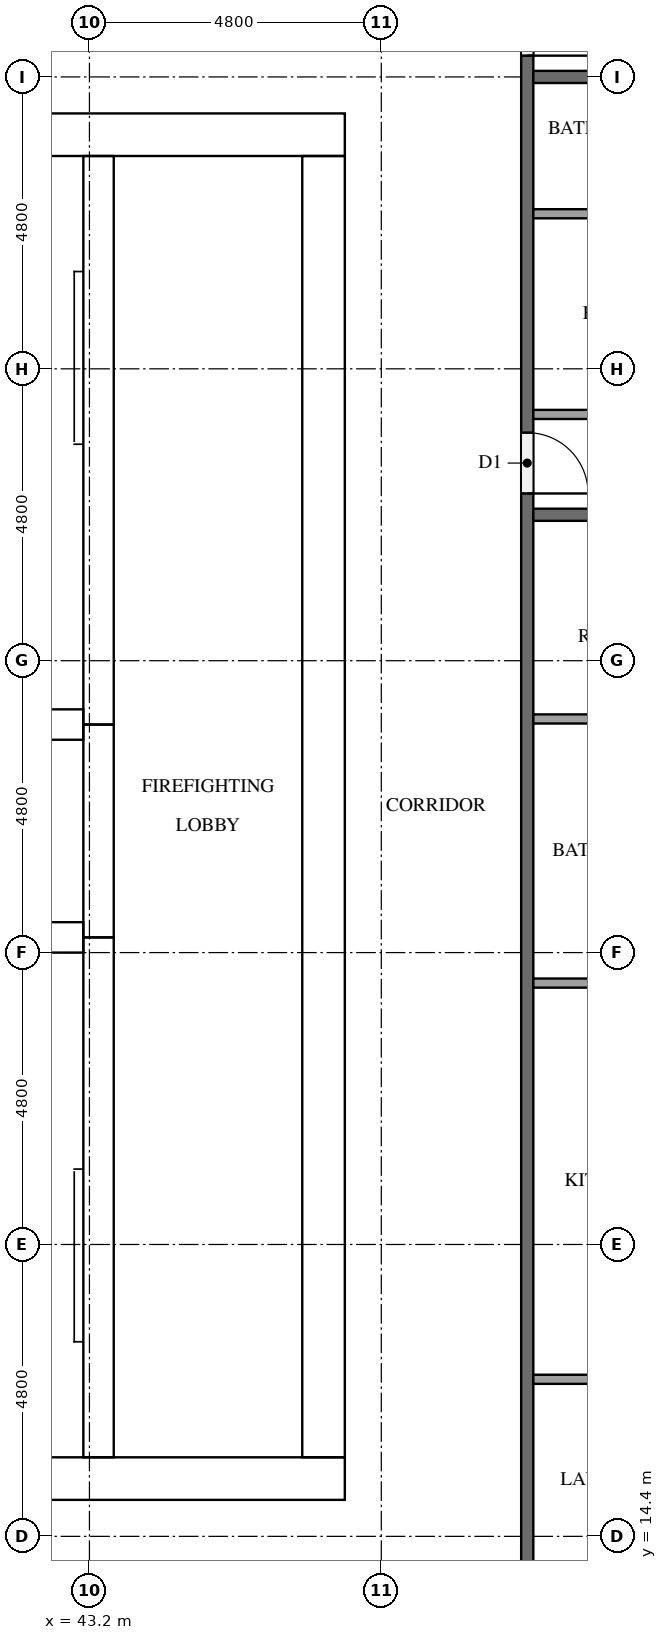
"""IFC4 building model, lengths in metres.
Left out: names, types, materials, properties, quantities, classifications, styles, units other than length and angle.
Written with IfcOpenShell. Run it as: python <this file> out.ifc"""

import sys

from ifc_helpers import new_model, si_unit, direction, frame, frame_2d, origin, place, context, subcontext, project, spatial, rectangle, extrude, element, fill, save


model = new_model("IFC4")
c1 = context("Model", 3, precision=1e-05, world=origin(), true_north=direction((0.0, 1.0)))
c2 = subcontext(c1, "Body", "Model", "MODEL_VIEW")
j1 = project(units=[si_unit("LENGTHUNIT", "METRE"), si_unit("PLANEANGLEUNIT", "RADIAN")], contexts=[c1])
p1 = place(None, origin())
s1 = spatial("IfcSite", under=j1, at=p1, CompositionType="ELEMENT")
p2 = place(p1, origin())
s2 = spatial("IfcBuilding", under=s1, at=p2, CompositionType="ELEMENT")
p3 = place(p2, frame((0.0, 0.0, 185.9)))
s3 = spatial("IfcBuildingStorey", under=s2, at=p3, CompositionType="ELEMENT", Elevation=185.9)
p4 = place(p3, frame((15.0, 15.35, 0.0), z_axis=(0.0, 0.0, 1.0), x_axis=(1.0, 0.0, 0.0)))
e1 = element("IfcWall", 1, at=p4, inside=s3, PredefinedType="SHEAR", context=c2, shape_type="SweptSolid", body=[
    extrude(rectangle(XDim=32.4, YDim=0.7, at=frame_2d((16.2, 0.0))), origin(), (0.0, 0.0, 1.0), 3.2),
])
p5 = place(p4, frame((15.3, 0.0, 0.0)))
e2 = element("IfcOpeningElement", 2, at=p5, cuts=e1, PredefinedType="OPENING", context=c2, shape_type="SweptSolid", body=[
    extrude(rectangle(XDim=1.8, YDim=2.1, at=frame_2d((0.9, 1.05))), frame((0.0, 0.36, 0.0), z_axis=(0.0, -1.0, 0.0), x_axis=(1.0, 0.0, 0.0)), (0.0, 0.0, 1.0), 0.72),
])
p6 = place(p3, frame((15.0, 37.45, 0.0), z_axis=(0.0, 0.0, 1.0), x_axis=(1.0, 0.0, 0.0)))
e3 = element("IfcWall", 3, at=p6, inside=s3, PredefinedType="SHEAR", context=c2, shape_type="SweptSolid", body=[
    extrude(rectangle(XDim=32.4, YDim=0.7, at=frame_2d((16.2, 0.0))), origin(), (0.0, 0.0, 1.0), 3.2),
])
p7 = place(p6, frame((15.3, 0.0, 0.0)))
e4 = element("IfcOpeningElement", 4, at=p7, cuts=e3, PredefinedType="OPENING", context=c2, shape_type="SweptSolid", body=[
    extrude(rectangle(XDim=1.8, YDim=2.1, at=frame_2d((0.9, 1.05))), frame((0.0, 0.36, 0.0), z_axis=(0.0, -1.0, 0.0), x_axis=(1.0, 0.0, 0.0)), (0.0, 0.0, 1.0), 0.72),
])
p8 = place(p6, frame((1.544, 0.0, 0.0)))
e5 = element("IfcOpeningElement", 5, at=p8, cuts=e3, PredefinedType="OPENING", context=c2, shape_type="SweptSolid", body=[
    extrude(rectangle(XDim=1.0, YDim=2.1, at=frame_2d((0.5, 1.05))), frame((0.0, 0.36, 0.0), z_axis=(0.0, -1.0, 0.0), x_axis=(1.0, 0.0, 0.0)), (0.0, 0.0, 1.0), 0.72),
])
p9 = place(p6, frame((5.219, 0.0, 0.0)))
e6 = element("IfcOpeningElement", 6, at=p9, cuts=e3, PredefinedType="OPENING", context=c2, shape_type="SweptSolid", body=[
    extrude(rectangle(XDim=1.0, YDim=2.1, at=frame_2d((0.5, 1.05))), frame((0.0, 0.36, 0.0), z_axis=(0.0, -1.0, 0.0), x_axis=(1.0, 0.0, 0.0)), (0.0, 0.0, 1.0), 0.72),
])
p10 = place(p3, frame((47.05, 15.7, 0.0), z_axis=(0.0, 0.0, 1.0), x_axis=(0.0, 1.0, 0.0)))
e7 = element("IfcWall", 7, at=p10, inside=s3, PredefinedType="SHEAR", context=c2, shape_type="SweptSolid", body=[
    extrude(rectangle(XDim=21.4, YDim=0.7, at=frame_2d((10.7, 0.0))), origin(), (0.0, 0.0, 1.0), 3.2),
])
p11 = place(p10, frame((10.4, 0.0, 0.0)))
e8 = element("IfcOpeningElement", 8, at=p11, cuts=e7, PredefinedType="OPENING", context=c2, shape_type="SweptSolid", body=[
    extrude(rectangle(XDim=1.2, YDim=2.1, at=frame_2d((0.6, 1.05))), frame((0.0, 0.36, 0.0), z_axis=(0.0, -1.0, 0.0), x_axis=(1.0, 0.0, 0.0)), (0.0, 0.0, 1.0), 0.72),
])
p12 = place(p3, frame((43.35, 15.7, 0.0), z_axis=(0.0, 0.0, 1.0), x_axis=(0.0, 1.0, 0.0)))
e9 = element("IfcWall", 9, at=p12, inside=s3, PredefinedType="SHEAR", context=c2, shape_type="SweptSolid", body=[
    extrude(rectangle(XDim=8.55, YDim=0.5, at=frame_2d((4.275, 0.0))), origin(), (0.0, 0.0, 1.0), 3.2),
])
p13 = place(p12, frame((0.5, 0.0, 0.0)))
e10 = element("IfcOpeningElement", 10, at=p13, cuts=e9, PredefinedType="OPENING", context=c2, shape_type="SweptSolid", body=[
    extrude(rectangle(XDim=1.2, YDim=2.1, at=frame_2d((0.6, 1.05))), frame((0.0, 0.26, 0.0), z_axis=(0.0, -1.0, 0.0), x_axis=(1.0, 0.0, 0.0)), (0.0, 0.0, 1.0), 0.52),
])
p14 = place(p3, frame((43.35, 24.25, 0.0), z_axis=(0.0, 0.0, 1.0), x_axis=(0.0, 1.0, 0.0)))
e11 = element("IfcWall", 11, at=p14, inside=s3, PredefinedType="SHEAR", context=c2, shape_type="SweptSolid", body=[
    extrude(rectangle(XDim=3.5, YDim=0.5, at=frame_2d((1.75, 0.0))), origin(), (0.0, 0.0, 1.0), 3.2),
])
p15 = place(p14, frame((1.2, 0.0, 0.0)))
e12 = element("IfcOpeningElement", 12, at=p15, cuts=e11, PredefinedType="OPENING", context=c2, shape_type="SweptSolid", body=[
    extrude(rectangle(XDim=1.1, YDim=2.1, at=frame_2d((0.55, 1.05))), frame((0.0, 0.26, 0.0), z_axis=(0.0, -1.0, 0.0), x_axis=(1.0, 0.0, 0.0)), (0.0, 0.0, 1.0), 0.52),
])
p16 = place(p3, frame((43.35, 27.75, 0.0), z_axis=(0.0, 0.0, 1.0), x_axis=(0.0, 1.0, 0.0)))
e13 = element("IfcWall", 13, at=p16, inside=s3, PredefinedType="SHEAR", context=c2, shape_type="SweptSolid", body=[
    extrude(rectangle(XDim=9.35, YDim=0.5, at=frame_2d((4.675, 0.0))), origin(), (0.0, 0.0, 1.0), 3.2),
])
p17 = place(p16, frame((7.65, 0.0, 0.0)))
e14 = element("IfcOpeningElement", 14, at=p17, cuts=e13, PredefinedType="OPENING", context=c2, shape_type="SweptSolid", body=[
    extrude(rectangle(XDim=1.2, YDim=2.1, at=frame_2d((0.6, 1.05))), frame((0.0, 0.26, 0.0), z_axis=(0.0, -1.0, 0.0), x_axis=(1.0, 0.0, 0.0)), (0.0, 0.0, 1.0), 0.52),
])
for number, where, z_axis, x_axis in (
    (15, (39.55, 24.25, 0.0), (0.0, 0.0, 1.0), (1.0, 0.0, 0.0)),
    (16, (39.55, 27.75, 0.0), (0.0, 0.0, 1.0), (1.0, 0.0, 0.0)),
):
    element("IfcWall", number, at=place(p3, frame(where, z_axis=z_axis, x_axis=x_axis)), inside=s3, PredefinedType="SHEAR", context=c2, shape_type="SweptSolid", body=[
        extrude(rectangle(XDim=3.55, YDim=0.5, at=frame_2d((1.775, 0.0))), origin(), (0.0, 0.0, 1.0), 3.2),
    ])
p18 = place(p3, frame((50.4, 40.7, 0.0), z_axis=(0.0, 0.0, 1.0), x_axis=(0.0, -1.0, 0.0)))
e17 = element("IfcWall", 17, at=p18, inside=s3, PredefinedType="PARTITIONING", context=c2, shape_type="SweptSolid", body=[
    extrude(rectangle(XDim=28.6, YDim=0.2, at=frame_2d((14.3, 0.0))), origin(), (0.0, 0.0, 1.0), 3.2),
])
p19 = place(p18, frame((27.3, 0.0, 0.0)))
e18 = element("IfcOpeningElement", 18, at=p19, cuts=e17, PredefinedType="OPENING", context=c2, shape_type="SweptSolid", body=[
    extrude(rectangle(XDim=1.1, YDim=2.1, at=frame_2d((0.55, 1.05))), frame((0.0, 0.11, 0.0), z_axis=(0.0, -1.0, 0.0), x_axis=(1.0, 0.0, 0.0)), (0.0, 0.0, 1.0), 0.22),
])
p20 = place(p18, frame((8.15, 0.0, 0.0)))
e19 = element("IfcOpeningElement", 19, at=p20, cuts=e17, PredefinedType="OPENING", context=c2, shape_type="SweptSolid", body=[
    extrude(rectangle(XDim=1.0, YDim=2.1, at=frame_2d((0.5, 1.05))), frame((0.0, 0.11, 0.0), z_axis=(0.0, -1.0, 0.0), x_axis=(1.0, 0.0, 0.0)), (0.0, 0.0, 1.0), 0.22),
])
p21 = place(p18, frame((0.95, 0.0, 0.0)))
e20 = element("IfcOpeningElement", 20, at=p21, cuts=e17, PredefinedType="OPENING", context=c2, shape_type="SweptSolid", body=[
    extrude(rectangle(XDim=1.0, YDim=2.1, at=frame_2d((0.5, 1.05))), frame((0.0, 0.11, 0.0), z_axis=(0.0, -1.0, 0.0), x_axis=(1.0, 0.0, 0.0)), (0.0, 0.0, 1.0), 0.22),
])
for number, where, z_axis, x_axis in (
    (21, (50.5, 31.2, 0.0), (0.0, 0.0, 1.0), (1.0, 0.0, 0.0)),
    (22, (50.5, 38.4, 0.0), (0.0, 0.0, 1.0), (1.0, 0.0, 0.0)),
):
    element("IfcWall", number, at=place(p3, frame(where, z_axis=z_axis, x_axis=x_axis)), inside=s3, PredefinedType="PARTITIONING", context=c2, shape_type="SweptSolid", body=[
        extrude(rectangle(XDim=11.8, YDim=0.2, at=frame_2d((5.9, 0.0))), origin(), (0.0, 0.0, 1.0), 3.2),
    ])
for number, where, z_axis, x_axis in (
    (23, (50.5, 16.983, 0.0), (0.0, 0.0, 1.0), (1.0, 0.0, 0.0)),
    (24, (50.5, 23.498, 0.0), (0.0, 0.0, 1.0), (1.0, 0.0, 0.0)),
    (25, (50.5, 27.842, 0.0), (0.0, 0.0, 1.0), (1.0, 0.0, 0.0)),
):
    element("IfcWall", number, at=place(p3, frame(where, z_axis=z_axis, x_axis=x_axis)), inside=s3, PredefinedType="PARTITIONING", context=c2, shape_type="SweptSolid", body=[
        extrude(rectangle(XDim=3.125, YDim=0.15, at=frame_2d((1.562, 0.0))), origin(), (0.0, 0.0, 1.0), 3.2),
    ])
p22 = place(p3, frame((50.5, 36.15, 0.0), z_axis=(0.0, 0.0, 1.0), x_axis=(1.0, 0.0, 0.0)))
e26 = element("IfcWall", 26, at=p22, inside=s3, PredefinedType="PARTITIONING", context=c2, shape_type="SweptSolid", body=[
    extrude(rectangle(XDim=3.725, YDim=0.15, at=frame_2d((1.863, 0.0))), origin(), (0.0, 0.0, 1.0), 3.2),
])
p23 = place(p3, frame((50.5, 32.85, 0.0), z_axis=(0.0, 0.0, 1.0), x_axis=(1.0, 0.0, 0.0)))
e27 = element("IfcWall", 27, at=p23, inside=s3, PredefinedType="PARTITIONING", context=c2, shape_type="SweptSolid", body=[
    extrude(rectangle(XDim=3.875, YDim=0.15, at=frame_2d((1.938, 0.0))), origin(), (0.0, 0.0, 1.0), 3.2),
])
p24 = place(p15, origin())
e28 = element("IfcDoor", 28, at=p24, inside=s3, OperationType="DOUBLE_DOOR_SLIDING", PredefinedType="DOOR", context=c2, shape_type="SweptSolid", body=[
    extrude(rectangle(XDim=1.1, YDim=2.1, at=frame_2d((0.55, 1.05))), frame((0.0, 0.025, 0.0), z_axis=(0.0, -1.0, 0.0), x_axis=(1.0, 0.0, 0.0)), (0.0, 0.0, 1.0), 0.05),
])
fill(e12, e28)
p25 = place(p13, origin())
e29 = element("IfcDoor", 29, at=p25, inside=s3, OperationType="SINGLE_SWING_LEFT", PredefinedType="DOOR", context=c2, shape_type="SweptSolid", body=[
    extrude(rectangle(XDim=1.2, YDim=2.1, at=frame_2d((0.6, 1.05))), frame((0.0, 0.025, 0.0), z_axis=(0.0, -1.0, 0.0), x_axis=(1.0, 0.0, 0.0)), (0.0, 0.0, 1.0), 0.05),
])
fill(e10, e29)
p26 = place(p17, origin())
e30 = element("IfcDoor", 30, at=p26, inside=s3, OperationType="SINGLE_SWING_RIGHT", PredefinedType="DOOR", context=c2, shape_type="SweptSolid", body=[
    extrude(rectangle(XDim=1.2, YDim=2.1, at=frame_2d((0.6, 1.05))), frame((0.0, 0.025, 0.0), z_axis=(0.0, -1.0, 0.0), x_axis=(1.0, 0.0, 0.0)), (0.0, 0.0, 1.0), 0.05),
])
fill(e14, e30)
p27 = place(p11, origin())
e31 = element("IfcDoor", 31, at=p27, inside=s3, OperationType="SINGLE_SWING_RIGHT", PredefinedType="DOOR", context=c2, shape_type="SweptSolid", body=[
    extrude(rectangle(XDim=1.2, YDim=2.1, at=frame_2d((0.6, 1.05))), frame((0.0, 0.025, 0.0), z_axis=(0.0, -1.0, 0.0), x_axis=(1.0, 0.0, 0.0)), (0.0, 0.0, 1.0), 0.05),
])
fill(e8, e31)
p28 = place(p20, origin())
e32 = element("IfcDoor", 32, at=p28, inside=s3, OperationType="SINGLE_SWING_RIGHT", PredefinedType="DOOR", context=c2, shape_type="SweptSolid", body=[
    extrude(rectangle(XDim=1.0, YDim=2.1, at=frame_2d((0.5, 1.05))), frame((0.0, 0.025, 0.0), z_axis=(0.0, -1.0, 0.0), x_axis=(1.0, 0.0, 0.0)), (0.0, 0.0, 1.0), 0.05),
])
fill(e19, e32)
p29 = place(p21, origin())
e33 = element("IfcDoor", 33, at=p29, inside=s3, OperationType="SINGLE_SWING_RIGHT", PredefinedType="DOOR", context=c2, shape_type="SweptSolid", body=[
    extrude(rectangle(XDim=1.0, YDim=2.1, at=frame_2d((0.5, 1.05))), frame((0.0, 0.025, 0.0), z_axis=(0.0, -1.0, 0.0), x_axis=(1.0, 0.0, 0.0)), (0.0, 0.0, 1.0), 0.05),
])
fill(e20, e33)
save(model, sys.argv[1])
